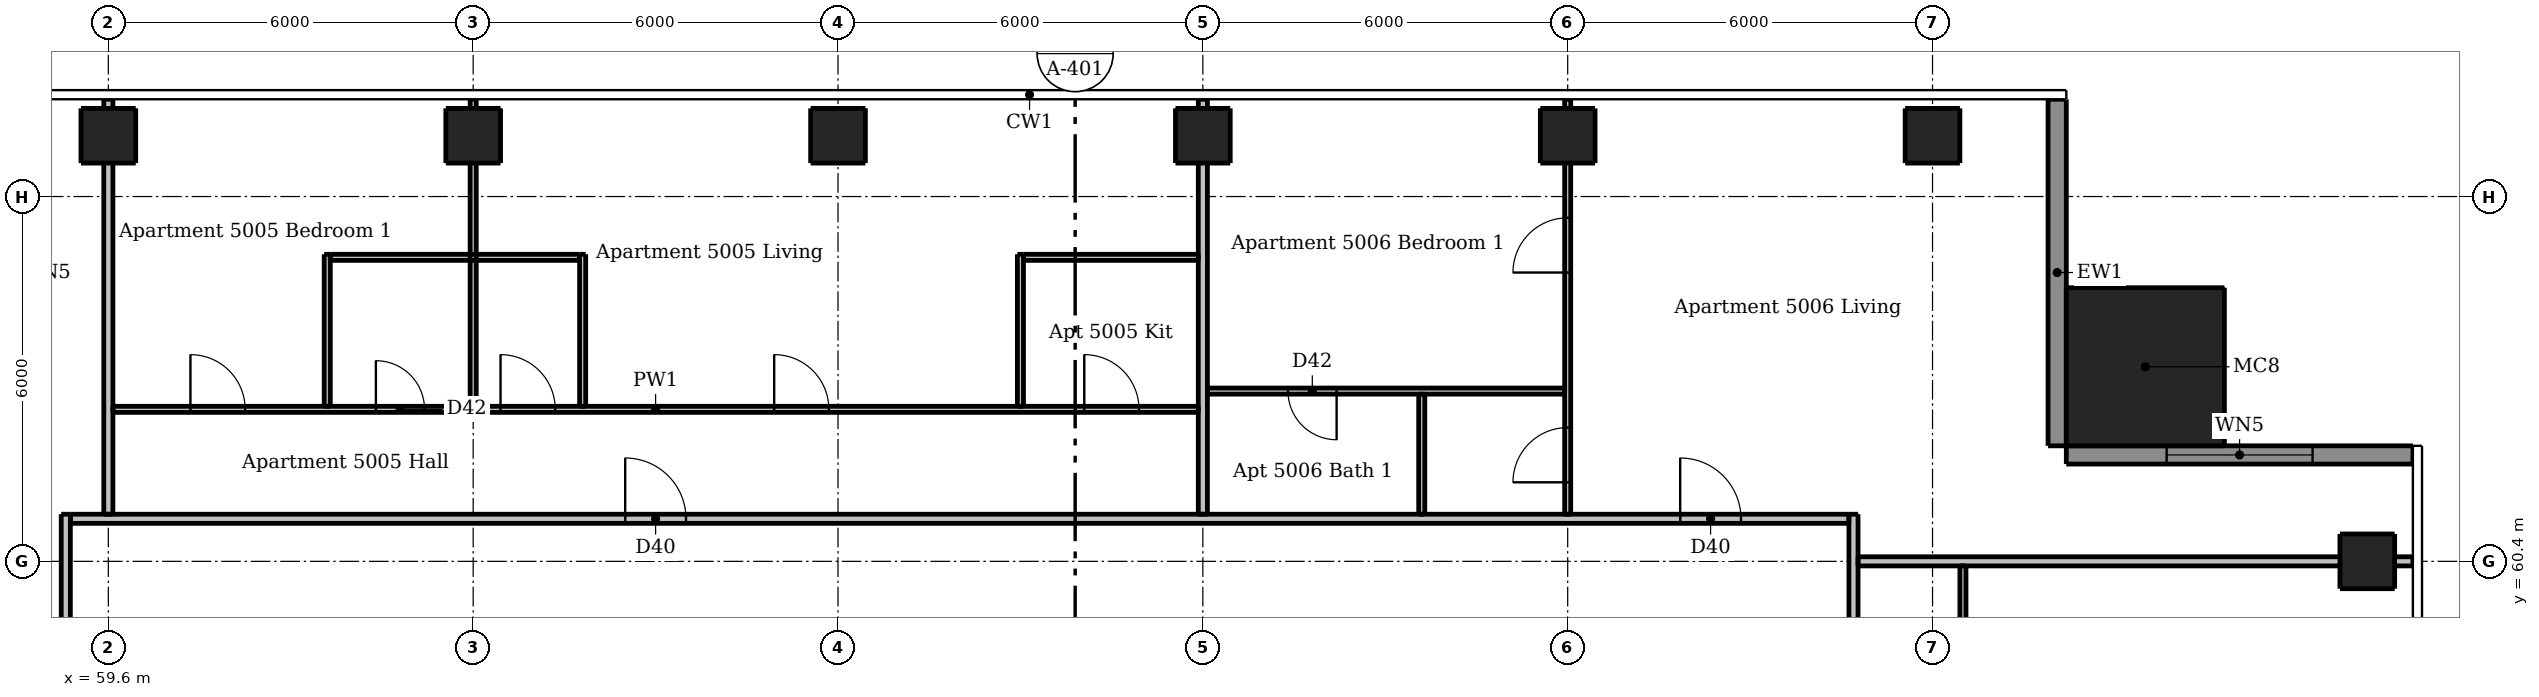
"""IFC4 building model, lengths in metres.
Left out: names, types, materials, properties, quantities, classifications, styles, units other than length and angle.
Written with IfcOpenShell. Run it as: python <this file> out.ifc"""

import sys

from ifc_helpers import new_model, si_unit, direction, frame, frame_2d, origin, origin_2d, place, context, subcontext, project, spatial, rectangle, extrude, element, fill, save


model = new_model("IFC4")
c1 = context("Model", 3, precision=1e-05, world=origin(), true_north=direction((0.0, 1.0)))
c2 = subcontext(c1, "Body", "Model", "MODEL_VIEW")
j1 = project(units=[si_unit("LENGTHUNIT", "METRE"), si_unit("PLANEANGLEUNIT", "RADIAN")], contexts=[c1])
p1 = place(None, origin())
s1 = spatial("IfcSite", under=j1, at=p1, CompositionType="ELEMENT")
p2 = place(p1, origin())
s2 = spatial("IfcBuilding", under=s1, at=p2, CompositionType="ELEMENT")
p3 = place(p2, frame((0.0, 0.0, 190.3)))
s3 = spatial("IfcBuildingStorey", under=s2, at=p3, CompositionType="ELEMENT", Elevation=190.3)
for number, where, z_axis, x_axis in (
    (1, (96.75, 60.4, 0.0), (0.0, 0.0, 1.0), (1.0, 0.0, 0.0)),
    (2, (59.6, 67.4, 0.0), (0.0, 0.0, 1.0), (1.0, 0.0, 0.0)),
    (3, (65.6, 67.4, 0.0), (0.0, 0.0, 1.0), (1.0, 0.0, 0.0)),
    (4, (71.6, 67.4, 0.0), (0.0, 0.0, 1.0), (1.0, 0.0, 0.0)),
    (5, (77.6, 67.4, 0.0), (0.0, 0.0, 1.0), (1.0, 0.0, 0.0)),
    (6, (83.6, 67.4, 0.0), (0.0, 0.0, 1.0), (1.0, 0.0, 0.0)),
    (7, (89.6, 67.4, 0.0), (0.0, 0.0, 1.0), (1.0, 0.0, 0.0)),
):
    element("IfcColumn", number, at=place(p3, frame(where, z_axis=z_axis, x_axis=x_axis)), inside=s3, PredefinedType="COLUMN", context=c2, shape_type="SweptSolid", body=[
        extrude(rectangle(XDim=0.9, YDim=0.9, at=origin_2d()), origin(), (0.0, 0.0, 1.0), 3.05),
    ])
p4 = place(p3, frame((93.1, 63.6, 0.0), z_axis=(0.0, 0.0, 1.0), x_axis=(1.0, 0.0, 0.0)))
e8 = element("IfcColumn", 8, at=p4, inside=s3, PredefinedType="COLUMN", context=c2, shape_type="SweptSolid", body=[
    extrude(rectangle(XDim=2.6, YDim=2.6, at=origin_2d()), origin(), (0.0, 0.0, 1.0), 3.3),
])
p5 = place(p3, frame((97.5, 62.15, 0.0), z_axis=(0.0, 0.0, 1.0), x_axis=(-1.0, 0.0, 0.0)))
e9 = element("IfcWall", 9, at=p5, inside=s3, PredefinedType="SOLIDWALL", context=c2, shape_type="SweptSolid", body=[
    extrude(rectangle(XDim=5.7, YDim=0.3, at=frame_2d((2.85, 0.0))), origin(), (0.0, 0.0, 1.0), 3.05),
])
p6 = place(p5, frame((1.65, 0.0, 0.15)))
e10 = element("IfcOpeningElement", 10, at=p6, cuts=e9, PredefinedType="OPENING", context=c2, shape_type="SweptSolid", body=[
    extrude(rectangle(XDim=2.4, YDim=2.1, at=frame_2d((1.2, 1.05))), frame((0.0, 0.16, 0.0), z_axis=(0.0, -1.0, 0.0), x_axis=(1.0, 0.0, 0.0)), (0.0, 0.0, 1.0), 0.32),
])
p7 = place(p3, frame((91.65, 62.3, 0.0), z_axis=(0.0, 0.0, 1.0), x_axis=(0.0, 1.0, 0.0)))
e11 = element("IfcWall", 11, at=p7, inside=s3, PredefinedType="SOLIDWALL", context=c2, shape_type="SweptSolid", body=[
    extrude(rectangle(XDim=5.7, YDim=0.3, at=frame_2d((2.85, 0.0))), origin(), (0.0, 0.0, 1.0), 3.05),
])
p8 = place(p3, frame((63.2, 62.95, 0.0), z_axis=(0.0, 0.0, 1.0), x_axis=(0.0, 1.0, 0.0)))
e12 = element("IfcWall", 12, at=p8, inside=s3, PredefinedType="PARTITIONING", context=c2, shape_type="SweptSolid", body=[
    extrude(rectangle(XDim=2.5, YDim=0.1, at=frame_2d((1.25, 0.0))), origin(), (0.0, 0.0, 1.0), 3.05),
])
p9 = place(p3, frame((65.6, 62.95, 0.0), z_axis=(0.0, 0.0, 1.0), x_axis=(0.0, 1.0, 0.0)))
e13 = element("IfcWall", 13, at=p9, inside=s3, PredefinedType="PARTITIONING", context=c2, shape_type="SweptSolid", body=[
    extrude(rectangle(XDim=5.05, YDim=0.1, at=frame_2d((2.525, 0.0))), origin(), (0.0, 0.0, 1.0), 2.516),
])
for number, where, z_axis, x_axis in (
    (14, (67.4, 62.95, 0.0), (0.0, 0.0, 1.0), (0.0, 1.0, 0.0)),
    (15, (74.6, 62.95, 0.0), (0.0, 0.0, 1.0), (0.0, 1.0, 0.0)),
):
    element("IfcWall", number, at=place(p3, frame(where, z_axis=z_axis, x_axis=x_axis)), inside=s3, PredefinedType="PARTITIONING", context=c2, shape_type="SweptSolid", body=[
        extrude(rectangle(XDim=2.5, YDim=0.1, at=frame_2d((1.25, 0.0))), origin(), (0.0, 0.0, 1.0), 3.05),
    ])
p10 = place(p3, frame((81.2, 61.175, 0.0), z_axis=(0.0, 0.0, 1.0), x_axis=(0.0, 1.0, 0.0)))
e16 = element("IfcWall", 16, at=p10, inside=s3, PredefinedType="PARTITIONING", context=c2, shape_type="SweptSolid", body=[
    extrude(rectangle(XDim=1.975, YDim=0.1, at=frame_2d((0.987, 0.0))), origin(), (0.0, 0.0, 1.0), 3.05),
])
p11 = place(p3, frame((83.6, 61.175, 0.0), z_axis=(0.0, 0.0, 1.0), x_axis=(0.0, 1.0, 0.0)))
e17 = element("IfcWall", 17, at=p11, inside=s3, PredefinedType="PARTITIONING", context=c2, shape_type="SweptSolid", body=[
    extrude(rectangle(XDim=6.825, YDim=0.1, at=frame_2d((3.413, 0.0))), origin(), (0.0, 0.0, 1.0), 2.516),
])
p12 = place(p11, frame((0.525, 0.0, 0.0)))
e18 = element("IfcOpeningElement", 18, at=p12, cuts=e17, PredefinedType="OPENING", context=c2, shape_type="SweptSolid", body=[
    extrude(rectangle(XDim=0.9, YDim=2.1, at=frame_2d((0.45, 1.05))), frame((0.0, 0.06, 0.0), z_axis=(0.0, -1.0, 0.0), x_axis=(1.0, 0.0, 0.0)), (0.0, 0.0, 1.0), 0.12),
])
p13 = place(p11, frame((3.975, 0.0, 0.0)))
e19 = element("IfcOpeningElement", 19, at=p13, cuts=e17, PredefinedType="OPENING", context=c2, shape_type="SweptSolid", body=[
    extrude(rectangle(XDim=0.9, YDim=2.1, at=frame_2d((0.45, 1.05))), frame((0.0, 0.06, 0.0), z_axis=(0.0, -1.0, 0.0), x_axis=(1.0, 0.0, 0.0)), (0.0, 0.0, 1.0), 0.12),
])
p14 = place(p3, frame((90.1, 60.325, 0.0), z_axis=(0.0, 0.0, 1.0), x_axis=(0.0, -1.0, 0.0)))
e20 = element("IfcWall", 20, at=p14, inside=s3, PredefinedType="PARTITIONING", context=c2, shape_type="SweptSolid", body=[
    extrude(rectangle(XDim=20.75, YDim=0.1, at=frame_2d((10.375, 0.0))), origin(), (0.0, 0.0, 1.0), 3.05),
])
p15 = place(p14, frame((17.425, 0.0, 0.0)))
e21 = element("IfcOpeningElement", 21, at=p15, cuts=e20, PredefinedType="OPENING", context=c2, shape_type="SweptSolid", body=[
    extrude(rectangle(XDim=0.9, YDim=2.1, at=frame_2d((0.45, 1.05))), frame((0.0, 0.06, 0.0), z_axis=(0.0, -1.0, 0.0), x_axis=(1.0, 0.0, 0.0)), (0.0, 0.0, 1.0), 0.12),
])
p16 = place(p14, frame((12.975, 0.0, 0.0)))
e22 = element("IfcOpeningElement", 22, at=p16, cuts=e20, PredefinedType="OPENING", context=c2, shape_type="SweptSolid", body=[
    extrude(rectangle(XDim=0.9, YDim=2.1, at=frame_2d((0.45, 1.05))), frame((0.0, 0.06, 0.0), z_axis=(0.0, -1.0, 0.0), x_axis=(1.0, 0.0, 0.0)), (0.0, 0.0, 1.0), 0.12),
])
p17 = place(p14, frame((7.275, 0.0, 0.0)))
e23 = element("IfcOpeningElement", 23, at=p17, cuts=e20, PredefinedType="OPENING", context=c2, shape_type="SweptSolid", body=[
    extrude(rectangle(XDim=0.9, YDim=2.1, at=frame_2d((0.45, 1.05))), frame((0.0, 0.06, 0.0), z_axis=(0.0, -1.0, 0.0), x_axis=(1.0, 0.0, 0.0)), (0.0, 0.0, 1.0), 0.12),
])
p18 = place(p14, frame((1.275, 0.0, 0.0)))
e24 = element("IfcOpeningElement", 24, at=p18, cuts=e20, PredefinedType="OPENING", context=c2, shape_type="SweptSolid", body=[
    extrude(rectangle(XDim=0.9, YDim=2.1, at=frame_2d((0.45, 1.05))), frame((0.0, 0.06, 0.0), z_axis=(0.0, -1.0, 0.0), x_axis=(1.0, 0.0, 0.0)), (0.0, 0.0, 1.0), 0.12),
])
p19 = place(p14, frame((10.325, 0.0, 0.0)))
e25 = element("IfcOpeningElement", 25, at=p19, cuts=e20, PredefinedType="OPENING", context=c2, shape_type="SweptSolid", body=[
    extrude(rectangle(XDim=0.8, YDim=2.1, at=frame_2d((0.4, 1.05))), frame((0.0, 0.06, 0.0), z_axis=(0.0, -1.0, 0.0), x_axis=(1.0, 0.0, 0.0)), (0.0, 0.0, 1.0), 0.12),
])
p20 = place(p14, frame((4.325, 0.0, 0.0)))
e26 = element("IfcOpeningElement", 26, at=p20, cuts=e20, PredefinedType="OPENING", context=c2, shape_type="SweptSolid", body=[
    extrude(rectangle(XDim=0.8, YDim=2.1, at=frame_2d((0.4, 1.05))), frame((0.0, 0.06, 0.0), z_axis=(0.0, -1.0, 0.0), x_axis=(1.0, 0.0, 0.0)), (0.0, 0.0, 1.0), 0.12),
])
p21 = place(p3, frame((63.25, 65.4, 0.0), z_axis=(0.0, 0.0, 1.0), x_axis=(1.0, 0.0, 0.0)))
e27 = element("IfcWall", 27, at=p21, inside=s3, PredefinedType="PARTITIONING", context=c2, shape_type="SweptSolid", body=[
    extrude(rectangle(XDim=4.1, YDim=0.1, at=frame_2d((2.05, 0.0))), origin(), (0.0, 0.0, 1.0), 3.05),
])
p22 = place(p3, frame((74.65, 65.4, 0.0), z_axis=(0.0, 0.0, 1.0), x_axis=(1.0, 0.0, 0.0)))
e28 = element("IfcWall", 28, at=p22, inside=s3, PredefinedType="PARTITIONING", context=c2, shape_type="SweptSolid", body=[
    extrude(rectangle(XDim=2.875, YDim=0.1, at=frame_2d((1.438, 0.0))), origin(), (0.0, 0.0, 1.0), 3.05),
])
p23 = place(p3, frame((83.55, 63.2, 0.0), z_axis=(0.0, 0.0, 1.0), x_axis=(-1.0, 0.0, 0.0)))
e29 = element("IfcWall", 29, at=p23, inside=s3, PredefinedType="PARTITIONING", context=c2, shape_type="SweptSolid", body=[
    extrude(rectangle(XDim=5.875, YDim=0.1, at=frame_2d((2.938, 0.0))), origin(), (0.0, 0.0, 1.0), 3.05),
])
p24 = place(p23, frame((3.75, 0.0, 0.0)))
e30 = element("IfcOpeningElement", 30, at=p24, cuts=e29, PredefinedType="OPENING", context=c2, shape_type="SweptSolid", body=[
    extrude(rectangle(XDim=0.8, YDim=2.1, at=frame_2d((0.4, 1.05))), frame((0.0, 0.06, 0.0), z_axis=(0.0, -1.0, 0.0), x_axis=(1.0, 0.0, 0.0)), (0.0, 0.0, 1.0), 0.12),
])
p25 = place(p3, frame((59.675, 62.9, 0.0), z_axis=(0.0, 0.0, 1.0), x_axis=(1.0, 0.0, 0.0)))
e31 = element("IfcWall", 31, at=p25, inside=s3, PredefinedType="PARTITIONING", context=c2, shape_type="SweptSolid", body=[
    extrude(rectangle(XDim=17.85, YDim=0.1, at=frame_2d((8.925, 0.0))), origin(), (0.0, 0.0, 1.0), 3.05),
])
p26 = place(p25, frame((10.875, 0.0, 0.0)))
e32 = element("IfcOpeningElement", 32, at=p26, cuts=e31, PredefinedType="OPENING", context=c2, shape_type="SweptSolid", body=[
    extrude(rectangle(XDim=0.9, YDim=2.1, at=frame_2d((0.45, 1.05))), frame((0.0, 0.06, 0.0), z_axis=(0.0, -1.0, 0.0), x_axis=(1.0, 0.0, 0.0)), (0.0, 0.0, 1.0), 0.12),
])
p27 = place(p25, frame((15.975, 0.0, 0.0)))
e33 = element("IfcOpeningElement", 33, at=p27, cuts=e31, PredefinedType="OPENING", context=c2, shape_type="SweptSolid", body=[
    extrude(rectangle(XDim=0.9, YDim=2.1, at=frame_2d((0.45, 1.05))), frame((0.0, 0.06, 0.0), z_axis=(0.0, -1.0, 0.0), x_axis=(1.0, 0.0, 0.0)), (0.0, 0.0, 1.0), 0.12),
])
p28 = place(p25, frame((6.375, 0.0, 0.0)))
e34 = element("IfcOpeningElement", 34, at=p28, cuts=e31, PredefinedType="OPENING", context=c2, shape_type="SweptSolid", body=[
    extrude(rectangle(XDim=0.9, YDim=2.1, at=frame_2d((0.45, 1.05))), frame((0.0, 0.06, 0.0), z_axis=(0.0, -1.0, 0.0), x_axis=(1.0, 0.0, 0.0)), (0.0, 0.0, 1.0), 0.12),
])
p29 = place(p25, frame((1.275, 0.0, 0.0)))
e35 = element("IfcOpeningElement", 35, at=p29, cuts=e31, PredefinedType="OPENING", context=c2, shape_type="SweptSolid", body=[
    extrude(rectangle(XDim=0.9, YDim=2.1, at=frame_2d((0.45, 1.05))), frame((0.0, 0.06, 0.0), z_axis=(0.0, -1.0, 0.0), x_axis=(1.0, 0.0, 0.0)), (0.0, 0.0, 1.0), 0.12),
])
p30 = place(p25, frame((4.325, 0.0, 0.0)))
e36 = element("IfcOpeningElement", 36, at=p30, cuts=e31, PredefinedType="OPENING", context=c2, shape_type="SweptSolid", body=[
    extrude(rectangle(XDim=0.8, YDim=2.1, at=frame_2d((0.4, 1.05))), frame((0.0, 0.06, 0.0), z_axis=(0.0, -1.0, 0.0), x_axis=(1.0, 0.0, 0.0)), (0.0, 0.0, 1.0), 0.12),
])
p31 = place(p3, frame((58.9, 30.325, 0.0), z_axis=(0.0, 0.0, 1.0), x_axis=(0.0, 1.0, 0.0)))
e37 = element("IfcWall", 37, at=p31, inside=s3, PredefinedType="PARTITIONING", context=c2, shape_type="SweptSolid", body=[
    extrude(rectangle(XDim=30.85, YDim=0.15, at=frame_2d((15.425, 0.0))), origin(), (0.0, 0.0, 1.0), 3.05),
])
p32 = place(p31, frame((9.225, 0.0, 0.0)))
e38 = element("IfcOpeningElement", 38, at=p32, cuts=e37, PredefinedType="OPENING", context=c2, shape_type="SweptSolid", body=[
    extrude(rectangle(XDim=1.0, YDim=2.1, at=frame_2d((0.5, 1.05))), frame((0.0, 0.085, 0.0), z_axis=(0.0, -1.0, 0.0), x_axis=(1.0, 0.0, 0.0)), (0.0, 0.0, 1.0), 0.17),
])
p33 = place(p31, frame((26.925, 0.0, 0.0)))
e39 = element("IfcOpeningElement", 39, at=p33, cuts=e37, PredefinedType="OPENING", context=c2, shape_type="SweptSolid", body=[
    extrude(rectangle(XDim=1.0, YDim=2.1, at=frame_2d((0.5, 1.05))), frame((0.0, 0.085, 0.0), z_axis=(0.0, -1.0, 0.0), x_axis=(1.0, 0.0, 0.0)), (0.0, 0.0, 1.0), 0.17),
])
p34 = place(p3, frame((59.6, 61.175, 0.0), z_axis=(0.0, 0.0, 1.0), x_axis=(0.0, 1.0, 0.0)))
e40 = element("IfcWall", 40, at=p34, inside=s3, PredefinedType="PARTITIONING", context=c2, shape_type="SweptSolid", body=[
    extrude(rectangle(XDim=6.825, YDim=0.15, at=frame_2d((3.413, 0.0))), origin(), (0.0, 0.0, 1.0), 2.51),
])
p35 = place(p3, frame((77.6, 61.175, 0.0), z_axis=(0.0, 0.0, 1.0), x_axis=(0.0, 1.0, 0.0)))
e41 = element("IfcWall", 41, at=p35, inside=s3, PredefinedType="PARTITIONING", context=c2, shape_type="SweptSolid", body=[
    extrude(rectangle(XDim=6.825, YDim=0.15, at=frame_2d((3.413, 0.0))), origin(), (0.0, 0.0, 1.0), 2.516),
])
p36 = place(p3, frame((88.3, 61.175, 0.0), z_axis=(0.0, 0.0, 1.0), x_axis=(0.0, -1.0, 0.0)))
e42 = element("IfcWall", 42, at=p36, inside=s3, PredefinedType="PARTITIONING", context=c2, shape_type="SweptSolid", body=[
    extrude(rectangle(XDim=29.4, YDim=0.15, at=frame_2d((14.7, 0.0))), origin(), (0.0, 0.0, 1.0), 3.05),
])
p37 = place(p36, frame((28.125, 0.0, 0.0)))
e43 = element("IfcOpeningElement", 43, at=p37, cuts=e42, PredefinedType="OPENING", context=c2, shape_type="SweptSolid", body=[
    extrude(rectangle(XDim=1.0, YDim=2.1, at=frame_2d((0.5, 1.05))), frame((0.0, 0.085, 0.0), z_axis=(0.0, -1.0, 0.0), x_axis=(1.0, 0.0, 0.0)), (0.0, 0.0, 1.0), 0.17),
])
p38 = place(p36, frame((10.725, 0.0, 0.0)))
e44 = element("IfcOpeningElement", 44, at=p38, cuts=e42, PredefinedType="OPENING", context=c2, shape_type="SweptSolid", body=[
    extrude(rectangle(XDim=1.0, YDim=2.1, at=frame_2d((0.5, 1.05))), frame((0.0, 0.085, 0.0), z_axis=(0.0, -1.0, 0.0), x_axis=(1.0, 0.0, 0.0)), (0.0, 0.0, 1.0), 0.17),
])
p39 = place(p3, frame((58.975, 61.1, 0.0), z_axis=(0.0, 0.0, 1.0), x_axis=(1.0, 0.0, 0.0)))
e45 = element("IfcWall", 45, at=p39, inside=s3, PredefinedType="PARTITIONING", context=c2, shape_type="SweptSolid", body=[
    extrude(rectangle(XDim=29.25, YDim=0.15, at=frame_2d((14.625, 0.0))), origin(), (0.0, 0.0, 1.0), 3.05),
])
p40 = place(p39, frame((9.125, 0.0, 0.0)))
e46 = element("IfcOpeningElement", 46, at=p40, cuts=e45, PredefinedType="OPENING", context=c2, shape_type="SweptSolid", body=[
    extrude(rectangle(XDim=1.0, YDim=2.1, at=frame_2d((0.5, 1.05))), frame((0.0, 0.085, 0.0), z_axis=(0.0, -1.0, 0.0), x_axis=(1.0, 0.0, 0.0)), (0.0, 0.0, 1.0), 0.17),
])
p41 = place(p39, frame((26.475, 0.0, 0.0)))
e47 = element("IfcOpeningElement", 47, at=p41, cuts=e45, PredefinedType="OPENING", context=c2, shape_type="SweptSolid", body=[
    extrude(rectangle(XDim=1.0, YDim=2.1, at=frame_2d((0.5, 1.05))), frame((0.0, 0.085, 0.0), z_axis=(0.0, -1.0, 0.0), x_axis=(1.0, 0.0, 0.0)), (0.0, 0.0, 1.0), 0.17),
])
p42 = place(p3, frame((88.375, 60.4, 0.0), z_axis=(0.0, 0.0, 1.0), x_axis=(1.0, 0.0, 0.0)))
e48 = element("IfcWall", 48, at=p42, inside=s3, PredefinedType="PARTITIONING", context=c2, shape_type="SweptSolid", body=[
    extrude(rectangle(XDim=9.125, YDim=0.15, at=frame_2d((4.562, 0.0))), origin(), (0.0, 0.0, 1.0), 2.59),
])
p43 = place(p6, origin())
e49 = element("IfcWindow", 49, at=p43, inside=s3, PartitioningType="DOUBLE_PANEL_VERTICAL", PredefinedType="WINDOW", context=c2, shape_type="SweptSolid", body=[
    extrude(rectangle(XDim=2.4, YDim=2.1, at=frame_2d((1.2, 1.05))), frame((0.0, 0.03, 0.0), z_axis=(0.0, -1.0, 0.0), x_axis=(1.0, 0.0, 0.0)), (0.0, 0.0, 1.0), 0.06),
])
fill(e10, e49)
p44 = place(p40, origin())
e50 = element("IfcDoor", 50, at=p44, inside=s3, OperationType="SINGLE_SWING_LEFT", PredefinedType="DOOR", context=c2, shape_type="SweptSolid", body=[
    extrude(rectangle(XDim=1.0, YDim=2.1, at=frame_2d((0.5, 1.05))), frame((0.0, 0.025, 0.0), z_axis=(0.0, -1.0, 0.0), x_axis=(1.0, 0.0, 0.0)), (0.0, 0.0, 1.0), 0.05),
])
fill(e46, e50)
p45 = place(p26, origin())
e51 = element("IfcDoor", 51, at=p45, inside=s3, OperationType="SINGLE_SWING_LEFT", PredefinedType="DOOR", context=c2, shape_type="SweptSolid", body=[
    extrude(rectangle(XDim=0.9, YDim=2.1, at=frame_2d((0.45, 1.05))), frame((0.0, 0.025, 0.0), z_axis=(0.0, -1.0, 0.0), x_axis=(1.0, 0.0, 0.0)), (0.0, 0.0, 1.0), 0.05),
])
fill(e32, e51)
p46 = place(p27, origin())
e52 = element("IfcDoor", 52, at=p46, inside=s3, OperationType="SINGLE_SWING_LEFT", PredefinedType="DOOR", context=c2, shape_type="SweptSolid", body=[
    extrude(rectangle(XDim=0.9, YDim=2.1, at=frame_2d((0.45, 1.05))), frame((0.0, 0.025, 0.0), z_axis=(0.0, -1.0, 0.0), x_axis=(1.0, 0.0, 0.0)), (0.0, 0.0, 1.0), 0.05),
])
fill(e33, e52)
p47 = place(p28, origin())
e53 = element("IfcDoor", 53, at=p47, inside=s3, OperationType="SINGLE_SWING_LEFT", PredefinedType="DOOR", context=c2, shape_type="SweptSolid", body=[
    extrude(rectangle(XDim=0.9, YDim=2.1, at=frame_2d((0.45, 1.05))), frame((0.0, 0.025, 0.0), z_axis=(0.0, -1.0, 0.0), x_axis=(1.0, 0.0, 0.0)), (0.0, 0.0, 1.0), 0.05),
])
fill(e34, e53)
p48 = place(p29, origin())
e54 = element("IfcDoor", 54, at=p48, inside=s3, OperationType="SINGLE_SWING_LEFT", PredefinedType="DOOR", context=c2, shape_type="SweptSolid", body=[
    extrude(rectangle(XDim=0.9, YDim=2.1, at=frame_2d((0.45, 1.05))), frame((0.0, 0.025, 0.0), z_axis=(0.0, -1.0, 0.0), x_axis=(1.0, 0.0, 0.0)), (0.0, 0.0, 1.0), 0.05),
])
fill(e35, e54)
p49 = place(p30, origin())
e55 = element("IfcDoor", 55, at=p49, inside=s3, OperationType="SINGLE_SWING_LEFT", PredefinedType="DOOR", context=c2, shape_type="SweptSolid", body=[
    extrude(rectangle(XDim=0.8, YDim=2.1, at=frame_2d((0.4, 1.05))), frame((0.0, 0.025, 0.0), z_axis=(0.0, -1.0, 0.0), x_axis=(1.0, 0.0, 0.0)), (0.0, 0.0, 1.0), 0.05),
])
fill(e36, e55)
p50 = place(p41, origin())
e56 = element("IfcDoor", 56, at=p50, inside=s3, OperationType="SINGLE_SWING_LEFT", PredefinedType="DOOR", context=c2, shape_type="SweptSolid", body=[
    extrude(rectangle(XDim=1.0, YDim=2.1, at=frame_2d((0.5, 1.05))), frame((0.0, 0.025, 0.0), z_axis=(0.0, -1.0, 0.0), x_axis=(1.0, 0.0, 0.0)), (0.0, 0.0, 1.0), 0.05),
])
fill(e47, e56)
p51 = place(p12, origin())
e57 = element("IfcDoor", 57, at=p51, inside=s3, OperationType="SINGLE_SWING_LEFT", PredefinedType="DOOR", context=c2, shape_type="SweptSolid", body=[
    extrude(rectangle(XDim=0.9, YDim=2.1, at=frame_2d((0.45, 1.05))), frame((0.0, 0.025, 0.0), z_axis=(0.0, -1.0, 0.0), x_axis=(1.0, 0.0, 0.0)), (0.0, 0.0, 1.0), 0.05),
])
fill(e18, e57)
p52 = place(p13, origin())
e58 = element("IfcDoor", 58, at=p52, inside=s3, OperationType="SINGLE_SWING_LEFT", PredefinedType="DOOR", context=c2, shape_type="SweptSolid", body=[
    extrude(rectangle(XDim=0.9, YDim=2.1, at=frame_2d((0.45, 1.05))), frame((0.0, 0.025, 0.0), z_axis=(0.0, -1.0, 0.0), x_axis=(1.0, 0.0, 0.0)), (0.0, 0.0, 1.0), 0.05),
])
fill(e19, e58)
p53 = place(p24, origin())
e59 = element("IfcDoor", 59, at=p53, inside=s3, OperationType="SINGLE_SWING_LEFT", PredefinedType="DOOR", context=c2, shape_type="SweptSolid", body=[
    extrude(rectangle(XDim=0.8, YDim=2.1, at=frame_2d((0.4, 1.05))), frame((0.0, 0.025, 0.0), z_axis=(0.0, -1.0, 0.0), x_axis=(1.0, 0.0, 0.0)), (0.0, 0.0, 1.0), 0.05),
])
fill(e30, e59)
save(model, sys.argv[1])
